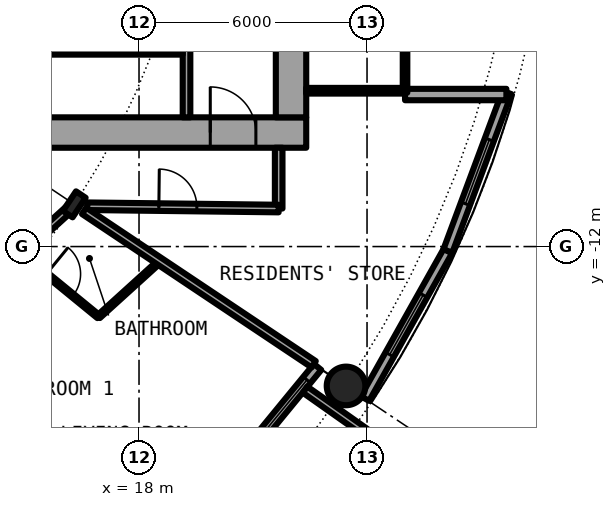
"""IFC4 building model, lengths in metres.
Left out: names, types, materials, properties, quantities, classifications, styles, units other than length and angle.
Written with IfcOpenShell. Run it as: python <this file> out.ifc"""

import sys

from ifc_helpers import new_model, si_unit, direction, frame, frame_2d, origin, origin_2d, place, context, subcontext, project, spatial, rectangle, hollow_circle, i_section, extrude, element, fill, save


model = new_model("IFC4")
c1 = context("Model", 3, precision=1e-05, world=origin(), true_north=direction((0.0, 1.0)))
c2 = subcontext(c1, "Body", "Model", "MODEL_VIEW")
j1 = project(units=[si_unit("LENGTHUNIT", "METRE"), si_unit("PLANEANGLEUNIT", "RADIAN")], contexts=[c1])
p1 = place(None, origin())
s1 = spatial("IfcSite", under=j1, at=p1, CompositionType="ELEMENT")
p2 = place(p1, origin())
s2 = spatial("IfcBuilding", under=s1, at=p2, CompositionType="ELEMENT")
p3 = place(p2, frame((0.0, 0.0, 31.95)))
s3 = spatial("IfcBuildingStorey", under=s2, at=p3, CompositionType="ELEMENT", Elevation=31.95)
p4 = place(p3, frame((23.448, -15.667, 0.0), z_axis=(0.0, 0.0, 1.0), x_axis=(1.0, 0.0, 0.0)))
e1 = element("IfcColumn", 1, at=p4, inside=s3, PredefinedType="COLUMN", context=c2, shape_type="SweptSolid", body=[
    extrude(hollow_circle(Radius=0.508, WallThickness=0.05, at=origin_2d()), origin(), (0.0, 0.0, 1.0), 3.05),
])
p5 = place(p3, frame((16.297, -10.889, 0.0), z_axis=(0.0, 0.0, 1.0), x_axis=(0.831469612303, -0.55557023302, 0.0)))
e2 = element("IfcColumn", 2, at=p5, inside=s3, PredefinedType="COLUMN", context=c2, shape_type="SweptSolid", body=[
    extrude(i_section(OverallWidth=0.305, OverallDepth=0.62, WebThickness=0.021, FlangeThickness=0.04, FilletRadius=0.027, at=origin_2d()), origin(), (0.0, 0.0, 1.0), 3.05),
])
p6 = place(p3, frame((19.304, -19.304, 0.0), z_axis=(0.0, 0.0, 1.0), x_axis=(0.634382322723, 0.773019449054, 0.0)))
e3 = element("IfcWall", 3, at=p6, inside=s3, PredefinedType="SOLIDWALL", context=c2, shape_type="SweptSolid", body=[
    extrude(rectangle(XDim=5.352, YDim=0.25, at=frame_2d((2.676, 0.0))), origin(), (0.0, 0.0, 1.0), 2.7),
])
p7 = place(p6, frame((0.841, 0.0, 0.0)))
e4 = element("IfcOpeningElement", 4, at=p7, cuts=e3, PredefinedType="OPENING", context=c2, shape_type="SweptSolid", body=[
    extrude(rectangle(XDim=1.0, YDim=2.2, at=frame_2d((0.5, 1.1))), frame((0.0, 0.135, 0.0), z_axis=(0.0, -1.0, 0.0), x_axis=(1.0, 0.0, 0.0)), (0.0, 0.0, 1.0), 0.27),
])
p8 = place(p6, frame((3.111, 0.0, 0.3)))
e5 = element("IfcOpeningElement", 5, at=p8, cuts=e3, PredefinedType="OPENING", context=c2, shape_type="SweptSolid", body=[
    extrude(rectangle(XDim=1.8, YDim=2.1, at=frame_2d((0.9, 1.05))), frame((0.0, 0.135, 0.0), z_axis=(0.0, -1.0, 0.0), x_axis=(1.0, 0.0, 0.0)), (0.0, 0.0, 1.0), 0.27),
])
p9 = place(p3, frame((22.37, -15.765, -0.03), z_axis=(0.0, 0.0, 1.0), x_axis=(0.817256123454, -0.576274612209, 0.0)))
e6 = element("IfcWall", 6, at=p9, inside=s3, PredefinedType="SOLIDWALL", context=c2, shape_type="SweptSolid", body=[
    extrude(rectangle(XDim=2.933, YDim=0.2, at=frame_2d((1.466, 0.0))), origin(), (0.0, 0.0, 1.0), 2.73),
])
p10 = place(p3, frame((23.946, -16.0, 0.0), z_axis=(0.0, 0.0, 1.0), x_axis=(0.489696356642, 0.871893042919, 0.0)))
e7 = element("IfcWall", 7, at=p10, inside=s3, PredefinedType="SOLIDWALL", context=c2, shape_type="SweptSolid", body=[
    extrude(rectangle(XDim=4.454, YDim=0.25, at=frame_2d((2.227, 0.0))), origin(), (0.0, 0.0, 1.0), 2.7),
])
p11 = place(p10, frame((1.327, 0.0, 0.3)))
e8 = element("IfcOpeningElement", 8, at=p11, cuts=e7, PredefinedType="OPENING", context=c2, shape_type="SweptSolid", body=[
    extrude(rectangle(XDim=1.8, YDim=2.1, at=frame_2d((0.9, 1.05))), frame((0.0, 0.135, 0.0), z_axis=(0.0, -1.0, 0.0), x_axis=(1.0, 0.0, 0.0)), (0.0, 0.0, 1.0), 0.27),
])
p12 = place(p3, frame((26.127, -12.117, 0.0), z_axis=(0.0, 0.0, 1.0), x_axis=(0.349247811493, 0.937030397675, 0.0)))
e9 = element("IfcWall", 9, at=p12, inside=s3, PredefinedType="SOLIDWALL", context=c2, shape_type="SweptSolid", body=[
    extrude(rectangle(XDim=4.452, YDim=0.25, at=frame_2d((2.226, 0.0))), origin(), (0.0, 0.0, 1.0), 2.7),
])
p13 = place(p12, frame((1.327, 0.0, 0.3)))
e10 = element("IfcOpeningElement", 10, at=p13, cuts=e9, PredefinedType="OPENING", context=c2, shape_type="SweptSolid", body=[
    extrude(rectangle(XDim=1.8, YDim=2.1, at=frame_2d((0.9, 1.05))), frame((0.0, 0.135, 0.0), z_axis=(0.0, -1.0, 0.0), x_axis=(1.0, 0.0, 0.0)), (0.0, 0.0, 1.0), 0.27),
])
p14 = place(p3, frame((25.0, -8.0, 0.0), z_axis=(0.0, 0.0, 1.0), x_axis=(1.0, 0.0, 0.0)))
e11 = element("IfcWall", 11, at=p14, inside=s3, PredefinedType="SOLIDWALL", context=c2, shape_type="SweptSolid", body=[
    extrude(rectangle(XDim=2.667, YDim=0.3, at=frame_2d((1.333, 0.0))), origin(), (0.0, 0.0, 1.0), 2.7),
])
p15 = place(p3, frame((8.2, -9.0, 0.0), z_axis=(0.0, 0.0, 1.0), x_axis=(1.0, 0.0, 0.0)))
e12 = element("IfcWall", 12, at=p15, inside=s3, PredefinedType="SHEAR", context=c2, shape_type="SweptSolid", body=[
    extrude(rectangle(XDim=14.2, YDim=0.8, at=frame_2d((7.1, 0.0))), origin(), (0.0, 0.0, 1.0), 3.05),
])
p16 = place(p15, frame((11.675, 0.0, 0.0)))
e13 = element("IfcOpeningElement", 13, at=p16, cuts=e12, PredefinedType="OPENING", context=c2, shape_type="SweptSolid", body=[
    extrude(rectangle(XDim=1.2, YDim=2.3, at=frame_2d((0.6, 1.15))), frame((0.0, 0.41, 0.0), z_axis=(0.0, -1.0, 0.0), x_axis=(1.0, 0.0, 0.0)), (0.0, 0.0, 1.0), 0.82),
])
p17 = place(p3, frame((22.0, 8.6, 0.0), z_axis=(0.0, 0.0, 1.0), x_axis=(0.0, -1.0, 0.0)))
e14 = element("IfcWall", 14, at=p17, inside=s3, PredefinedType="SHEAR", context=c2, shape_type="SweptSolid", body=[
    extrude(rectangle(XDim=17.2, YDim=0.8, at=frame_2d((8.6, 0.0))), origin(), (0.0, 0.0, 1.0), 3.05),
])
p18 = place(p17, frame((7.7, 0.0, 0.0)))
e15 = element("IfcOpeningElement", 15, at=p18, cuts=e14, PredefinedType="OPENING", context=c2, shape_type="SweptSolid", body=[
    extrude(rectangle(XDim=1.8, YDim=2.3, at=frame_2d((0.9, 1.15))), frame((0.0, 0.41, 0.0), z_axis=(0.0, -1.0, 0.0), x_axis=(1.0, 0.0, 0.0)), (0.0, 0.0, 1.0), 0.82),
])
p19 = place(p3, frame((19.25, -8.6, 0.0), z_axis=(0.0, 0.0, 1.0), x_axis=(0.0, 1.0, 0.0)))
e16 = element("IfcWall", 16, at=p19, inside=s3, PredefinedType="SOLIDWALL", context=c2, shape_type="SweptSolid", body=[
    extrude(rectangle(XDim=7.025, YDim=0.2, at=frame_2d((3.513, 0.0))), origin(), (0.0, 0.0, 1.0), 2.7),
])
p20 = place(p19, frame((2.35, 0.0, 0.0)))
e17 = element("IfcOpeningElement", 17, at=p20, cuts=e16, PredefinedType="OPENING", context=c2, shape_type="SweptSolid", body=[
    extrude(rectangle(XDim=1.1, YDim=2.3, at=frame_2d((0.55, 1.15))), frame((0.0, 0.11, 0.0), z_axis=(0.0, -1.0, 0.0), x_axis=(1.0, 0.0, 0.0)), (0.0, 0.0, 1.0), 0.22),
])
p21 = place(p3, frame((15.45, -6.875, 0.0), z_axis=(0.0, 0.0, 1.0), x_axis=(1.0, 0.0, 0.0)))
e18 = element("IfcWall", 18, at=p21, inside=s3, PredefinedType="PARTITIONING", context=c2, shape_type="SweptSolid", body=[
    extrude(rectangle(XDim=3.7, YDim=0.15, at=frame_2d((1.85, 0.0))), origin(), (0.0, 0.0, 1.0), 2.7),
])
p22 = place(p21, frame((1.4, 0.0, 0.0)))
e19 = element("IfcOpeningElement", 19, at=p22, cuts=e18, PredefinedType="OPENING", context=c2, shape_type="SweptSolid", body=[
    extrude(rectangle(XDim=0.9, YDim=2.3, at=frame_2d((0.45, 1.15))), frame((0.0, 0.085, 0.0), z_axis=(0.0, -1.0, 0.0), x_axis=(1.0, 0.0, 0.0)), (0.0, 0.0, 1.0), 0.17),
])
p23 = place(p3, frame((22.4, -7.9, 0.0), z_axis=(0.0, 0.0, 1.0), x_axis=(1.0, 0.0, 0.0)))
e20 = element("IfcWall", 20, at=p23, inside=s3, PredefinedType="PARTITIONING", context=c2, shape_type="SweptSolid", body=[
    extrude(rectangle(XDim=2.54, YDim=0.15, at=frame_2d((1.27, 0.0))), origin(), (0.0, 0.0, 1.0), 2.7),
])
p24 = place(p3, frame((25.0, -7.95, 0.0), z_axis=(0.0, 0.0, 1.0), x_axis=(0.0, 1.0, 0.0)))
e21 = element("IfcWall", 21, at=p24, inside=s3, PredefinedType="PARTITIONING", context=c2, shape_type="SweptSolid", body=[
    extrude(rectangle(XDim=15.9, YDim=0.12, at=frame_2d((7.95, 0.0))), origin(), (0.0, 0.0, 1.0), 2.7),
])
p25 = place(p24, frame((0.95, 0.0, 0.1)))
e22 = element("IfcOpeningElement", 22, at=p25, cuts=e21, PredefinedType="OPENING", context=c2, shape_type="SweptSolid", body=[
    extrude(rectangle(XDim=14.0, YDim=2.35, at=frame_2d((7.0, 1.175))), frame((0.0, 0.07, 0.0), z_axis=(0.0, -1.0, 0.0), x_axis=(1.0, 0.0, 0.0)), (0.0, 0.0, 1.0), 0.14),
])
p26 = place(p3, frame((21.675, -11.0, 0.0), z_axis=(0.0, 0.0, 1.0), x_axis=(0.0, 1.0, 0.0)))
e23 = element("IfcWall", 23, at=p26, inside=s3, PredefinedType="PARTITIONING", context=c2, shape_type="SweptSolid", body=[
    extrude(rectangle(XDim=1.6, YDim=0.2, at=frame_2d((0.8, 0.0))), origin(), (0.0, 0.0, 1.0), 2.7),
])
p27 = place(p3, frame((16.936, -13.845, 0.0), z_axis=(0.0, 0.0, 1.0), x_axis=(0.740836325503, 0.671685595212, 0.0)))
e24 = element("IfcWall", 24, at=p27, inside=s3, PredefinedType="PARTITIONING", context=c2, shape_type="SweptSolid", body=[
    extrude(rectangle(XDim=2.168, YDim=0.1, at=frame_2d((1.084, 0.0))), origin(), (0.0, 0.0, 1.0), 2.7),
])
p28 = place(p3, frame((9.239, -17.286, 0.0), z_axis=(0.0, 0.0, 1.0), x_axis=(0.74089212117, 0.671624050186, 0.0)))
e25 = element("IfcWall", 25, at=p28, inside=s3, PredefinedType="PARTITIONING", context=c2, shape_type="SweptSolid", body=[
    extrude(rectangle(XDim=9.368, YDim=0.2, at=frame_2d((4.684, 0.0))), origin(), (0.0, 0.0, 1.0), 2.38),
])
p29 = place(p28, frame((5.215, 0.0, 0.0)))
e26 = element("IfcOpeningElement", 26, at=p29, cuts=e25, PredefinedType="OPENING", context=c2, shape_type="SweptSolid", body=[
    extrude(rectangle(XDim=1.0, YDim=2.3, at=frame_2d((0.5, 1.15))), frame((0.0, 0.11, 0.0), z_axis=(0.0, -1.0, 0.0), x_axis=(1.0, 0.0, 0.0)), (0.0, 0.0, 1.0), 0.22),
])
p30 = place(p3, frame((16.636, -10.939, 0.0), z_axis=(0.0, 0.0, 1.0), x_axis=(0.999926652916, -0.012111514691, 0.0)))
e27 = element("IfcWall", 27, at=p30, inside=s3, PredefinedType="PARTITIONING", context=c2, shape_type="SweptSolid", body=[
    extrude(rectangle(XDim=5.04, YDim=0.2, at=frame_2d((2.52, 0.0))), origin(), (0.0, 0.0, 1.0), 2.7),
])
p31 = place(p30, frame((1.886, 0.0, 0.0)))
e28 = element("IfcOpeningElement", 28, at=p31, cuts=e27, PredefinedType="OPENING", context=c2, shape_type="SweptSolid", body=[
    extrude(rectangle(XDim=1.0, YDim=2.3, at=frame_2d((0.5, 1.15))), frame((0.0, 0.11, 0.0), z_axis=(0.0, -1.0, 0.0), x_axis=(1.0, 0.0, 0.0)), (0.0, 0.0, 1.0), 0.22),
])
p32 = place(p3, frame((12.062, -14.727, 0.0), z_axis=(0.0, 0.0, 1.0), x_axis=(0.633664062855, -0.773608334654, 0.0)))
e29 = element("IfcWall", 29, at=p32, inside=s3, PredefinedType="PARTITIONING", context=c2, shape_type="SweptSolid", body=[
    extrude(rectangle(XDim=8.138, YDim=0.1, at=frame_2d((4.069, 0.0))), origin(), (0.0, 0.0, 1.0), 2.7),
])
p33 = place(p32, frame((0.861, 0.0, 0.0)))
e30 = element("IfcOpeningElement", 30, at=p33, cuts=e29, PredefinedType="OPENING", context=c2, shape_type="SweptSolid", body=[
    extrude(rectangle(XDim=0.9, YDim=2.3, at=frame_2d((0.45, 1.15))), frame((0.0, 0.06, 0.0), z_axis=(0.0, -1.0, 0.0), x_axis=(1.0, 0.0, 0.0)), (0.0, 0.0, 1.0), 0.12),
])
p34 = place(p32, frame((4.931, 0.0, 0.0)))
e31 = element("IfcOpeningElement", 31, at=p34, cuts=e29, PredefinedType="OPENING", context=c2, shape_type="SweptSolid", body=[
    extrude(rectangle(XDim=0.9, YDim=2.3, at=frame_2d((0.45, 1.15))), frame((0.0, 0.06, 0.0), z_axis=(0.0, -1.0, 0.0), x_axis=(1.0, 0.0, 0.0)), (0.0, 0.0, 1.0), 0.12),
])
p35 = place(p3, frame((14.885, -12.168, 0.0), z_axis=(0.0, 0.0, 1.0), x_axis=(0.774162545943, -0.632986850147, 0.0)))
e32 = element("IfcWall", 32, at=p35, inside=s3, PredefinedType="PARTITIONING", context=c2, shape_type="SweptSolid", body=[
    extrude(rectangle(XDim=2.649, YDim=0.1, at=frame_2d((1.325, 0.0))), origin(), (0.0, 0.0, 1.0), 2.7),
])
p36 = place(p35, frame((0.875, 0.0, 0.0)))
e33 = element("IfcOpeningElement", 33, at=p36, cuts=e32, PredefinedType="OPENING", context=c2, shape_type="SweptSolid", body=[
    extrude(rectangle(XDim=0.9, YDim=2.3, at=frame_2d((0.45, 1.15))), frame((0.0, 0.06, 0.0), z_axis=(0.0, -1.0, 0.0), x_axis=(1.0, 0.0, 0.0)), (0.0, 0.0, 1.0), 0.12),
])
p37 = place(p3, frame((16.555, -11.061, 0.0), z_axis=(0.0, 0.0, 1.0), x_axis=(0.831507055747, -0.555514190857, 0.0)))
e34 = element("IfcWall", 34, at=p37, inside=s3, PredefinedType="PARTITIONING", context=c2, shape_type="SweptSolid", body=[
    extrude(rectangle(XDim=7.265, YDim=0.2, at=frame_2d((3.633, 0.0))), origin(), (0.0, 0.0, 1.0), 2.7),
])
p38 = place(p8, origin())
e35 = element("IfcWindow", 35, at=p38, inside=s3, PartitioningType="SINGLE_PANEL", PredefinedType="WINDOW", context=c2, shape_type="SweptSolid", body=[
    extrude(rectangle(XDim=1.8, YDim=2.1, at=frame_2d((0.9, 1.05))), frame((0.0, 0.03, 0.0), z_axis=(0.0, -1.0, 0.0), x_axis=(1.0, 0.0, 0.0)), (0.0, 0.0, 1.0), 0.06),
])
fill(e5, e35)
p39 = place(p11, origin())
e36 = element("IfcWindow", 36, at=p39, inside=s3, PartitioningType="SINGLE_PANEL", PredefinedType="WINDOW", context=c2, shape_type="SweptSolid", body=[
    extrude(rectangle(XDim=1.8, YDim=2.1, at=frame_2d((0.9, 1.05))), frame((0.0, 0.03, 0.0), z_axis=(0.0, -1.0, 0.0), x_axis=(1.0, 0.0, 0.0)), (0.0, 0.0, 1.0), 0.06),
])
fill(e8, e36)
p40 = place(p13, origin())
e37 = element("IfcWindow", 37, at=p40, inside=s3, PartitioningType="SINGLE_PANEL", PredefinedType="WINDOW", context=c2, shape_type="SweptSolid", body=[
    extrude(rectangle(XDim=1.8, YDim=2.1, at=frame_2d((0.9, 1.05))), frame((0.0, 0.03, 0.0), z_axis=(0.0, -1.0, 0.0), x_axis=(1.0, 0.0, 0.0)), (0.0, 0.0, 1.0), 0.06),
])
fill(e10, e37)
p41 = place(p22, origin())
e38 = element("IfcDoor", 38, at=p41, inside=s3, OperationType="SINGLE_SWING_LEFT", PredefinedType="DOOR", context=c2, shape_type="SweptSolid", body=[
    extrude(rectangle(XDim=0.9, YDim=2.3, at=frame_2d((0.45, 1.15))), frame((0.0, 0.025, 0.0), z_axis=(0.0, -1.0, 0.0), x_axis=(1.0, 0.0, 0.0)), (0.0, 0.0, 1.0), 0.05),
])
fill(e19, e38)
p42 = place(p16, origin())
e39 = element("IfcDoor", 39, at=p42, inside=s3, OperationType="SINGLE_SWING_LEFT", PredefinedType="DOOR", context=c2, shape_type="SweptSolid", body=[
    extrude(rectangle(XDim=1.2, YDim=2.3, at=frame_2d((0.6, 1.15))), frame((0.0, 0.025, 0.0), z_axis=(0.0, -1.0, 0.0), x_axis=(1.0, 0.0, 0.0)), (0.0, 0.0, 1.0), 0.05),
])
fill(e13, e39)
p43 = place(p25, origin())
e40 = element("IfcWindow", 40, at=p43, inside=s3, PartitioningType="SINGLE_PANEL", PredefinedType="WINDOW", context=c2, shape_type="SweptSolid", body=[
    extrude(rectangle(XDim=14.0, YDim=2.35, at=frame_2d((7.0, 1.175))), frame((0.0, 0.03, 0.0), z_axis=(0.0, -1.0, 0.0), x_axis=(1.0, 0.0, 0.0)), (0.0, 0.0, 1.0), 0.06),
])
fill(e22, e40)
p44 = place(p36, origin())
e41 = element("IfcDoor", 41, at=p44, inside=s3, OperationType="SINGLE_SWING_RIGHT", PredefinedType="DOOR", context=c2, shape_type="SweptSolid", body=[
    extrude(rectangle(XDim=0.9, YDim=2.3, at=frame_2d((0.45, 1.15))), frame((0.0, 0.025, 0.0), z_axis=(0.0, -1.0, 0.0), x_axis=(1.0, 0.0, 0.0)), (0.0, 0.0, 1.0), 0.05),
])
fill(e33, e41)
p45 = place(p31, origin())
e42 = element("IfcDoor", 42, at=p45, inside=s3, OperationType="SINGLE_SWING_LEFT", PredefinedType="DOOR", context=c2, shape_type="SweptSolid", body=[
    extrude(rectangle(XDim=1.0, YDim=2.3, at=frame_2d((0.5, 1.15))), frame((0.0, 0.025, 0.0), z_axis=(0.0, -1.0, 0.0), x_axis=(1.0, 0.0, 0.0)), (0.0, 0.0, 1.0), 0.05),
])
fill(e28, e42)
save(model, sys.argv[1])
